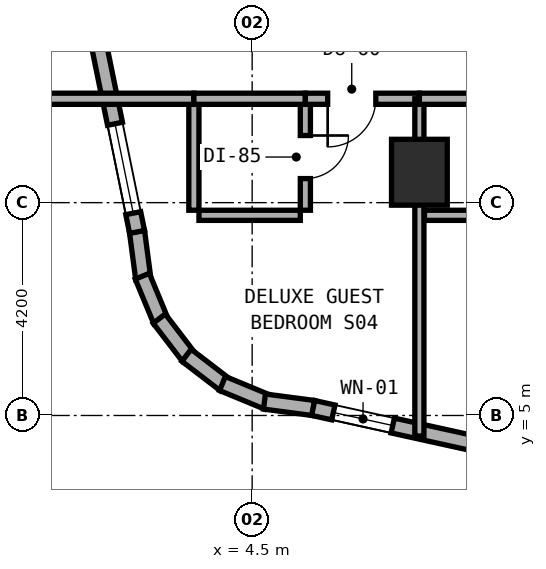
"""IFC4 building model, lengths in metres.
Left out: names, types, materials, properties, quantities, classifications, styles, units other than length and angle.
Written with IfcOpenShell. Run it as: python <this file> out.ifc"""

import sys

from ifc_helpers import new_model, si_unit, direction, frame, frame_2d, origin, origin_2d, place, context, subcontext, project, spatial, rectangle, extrude, element, fill, save


model = new_model("IFC4")
c1 = context("Model", 3, precision=1e-05, world=origin(), true_north=direction((0.0, 1.0)))
c2 = subcontext(c1, "Body", "Model", "MODEL_VIEW")
j1 = project(units=[si_unit("LENGTHUNIT", "METRE"), si_unit("PLANEANGLEUNIT", "RADIAN")], contexts=[c1])
p1 = place(None, origin())
s1 = spatial("IfcSite", under=j1, at=p1, CompositionType="ELEMENT")
p2 = place(p1, origin())
s2 = spatial("IfcBuilding", under=s1, at=p2, CompositionType="ELEMENT")
p3 = place(p2, frame((0.0, 0.0, 31.0)))
s3 = spatial("IfcBuildingStorey", under=s2, at=p3, CompositionType="ELEMENT", Elevation=31.0)
p4 = place(p3, frame((7.8, 9.8, 0.0), z_axis=(0.0, 0.0, 1.0), x_axis=(1.0, 0.0, 0.0)))
e1 = element("IfcColumn", 1, at=p4, inside=s3, PredefinedType="COLUMN", context=c2, shape_type="SweptSolid", body=[
    extrude(rectangle(XDim=1.1, YDim=1.3, at=origin_2d()), origin(), (0.0, 0.0, 1.0), 3.5),
])
p5 = place(p3, frame((2.228, 8.628, 0.0), z_axis=(0.0, 0.0, 1.0), x_axis=(0.131174864804, -0.991359246108, 0.0)))
e2 = element("IfcWall", 2, at=p5, inside=s3, PredefinedType="STANDARD", context=c2, shape_type="SweptSolid", body=[
    extrude(rectangle(XDim=0.938, YDim=0.3, at=frame_2d((0.469, 0.0))), origin(), (0.0, 0.0, 1.0), 3.22),
])
p6 = place(p3, frame((2.332, 7.748, 0.0), z_axis=(0.0, 0.0, 1.0), x_axis=(0.382344263057, -0.924019948111, 0.0)))
e3 = element("IfcWall", 3, at=p6, inside=s3, PredefinedType="STANDARD", context=c2, shape_type="SweptSolid", body=[
    extrude(rectangle(XDim=0.955, YDim=0.3, at=frame_2d((0.477, 0.0))), origin(), (0.0, 0.0, 1.0), 3.22),
])
for number, where, z_axis, x_axis in (
    (4, (2.666, 6.911, 0.0), (0.0, 0.0, 1.0), (0.608, -0.794, 0.0)),
    (5, (3.205, 6.188, 0.0), (0.0, 0.0, 1.0), (0.794, -0.608, 0.0)),
):
    element("IfcWall", number, at=place(p3, frame(where, z_axis=z_axis, x_axis=x_axis)), inside=s3, PredefinedType="STANDARD", context=c2, shape_type="SweptSolid", body=[
        extrude(rectangle(XDim=0.955, YDim=0.3, at=frame_2d((0.478, 0.0))), origin(), (0.0, 0.0, 1.0), 3.22),
    ])
p7 = place(p3, frame((3.914, 5.631, 0.0), z_axis=(0.0, 0.0, 1.0), x_axis=(0.923982547689, -0.382434636986, 0.0)))
e6 = element("IfcWall", 6, at=p7, inside=s3, PredefinedType="STANDARD", context=c2, shape_type="SweptSolid", body=[
    extrude(rectangle(XDim=0.954, YDim=0.3, at=frame_2d((0.477, 0.0))), origin(), (0.0, 0.0, 1.0), 3.22),
])
p8 = place(p3, frame((4.743, 5.275, 0.0), z_axis=(0.0, 0.0, 1.0), x_axis=(0.99145856342, -0.130422072598, 0.0)))
e7 = element("IfcWall", 7, at=p8, inside=s3, PredefinedType="STANDARD", context=c2, shape_type="SweptSolid", body=[
    extrude(rectangle(XDim=0.973, YDim=0.3, at=frame_2d((0.487, 0.0))), origin(), (0.0, 0.0, 1.0), 3.22),
])
p9 = place(p3, frame((5.704, 5.148, 0.0), z_axis=(0.0, 0.0, 1.0), x_axis=(0.9765437942, -0.215318875183, 0.0)))
e8 = element("IfcWall", 8, at=p9, inside=s3, PredefinedType="STANDARD", context=c2, shape_type="SweptSolid", body=[
    extrude(rectangle(XDim=9.353, YDim=0.3, at=frame_2d((4.677, 0.0))), origin(), (0.0, 0.0, 1.0), 3.22),
])
p10 = place(p9, frame((0.408, 0.0, 0.85)))
e9 = element("IfcOpeningElement", 9, at=p10, cuts=e8, PredefinedType="OPENING", context=c2, shape_type="SweptSolid", body=[
    extrude(rectangle(XDim=1.2, YDim=1.5, at=frame_2d((0.6, 0.75))), frame((0.0, 0.16, 0.0), z_axis=(0.0, -1.0, 0.0), x_axis=(1.0, 0.0, 0.0)), (0.0, 0.0, 1.0), 0.32),
])
p11 = place(p9, frame((4.59, 0.0, 0.8)))
e10 = element("IfcOpeningElement", 10, at=p11, cuts=e8, PredefinedType="OPENING", context=c2, shape_type="SweptSolid", body=[
    extrude(rectangle(XDim=2.4, YDim=1.6, at=frame_2d((1.2, 0.8))), frame((0.0, 0.16, 0.0), z_axis=(0.0, -1.0, 0.0), x_axis=(1.0, 0.0, 0.0)), (0.0, 0.0, 1.0), 0.32),
])
p12 = place(p3, frame((0.216, 18.484, 0.0), z_axis=(0.0, 0.0, 1.0), x_axis=(0.199990901713, -0.979797754249, 0.0)))
e11 = element("IfcWall", 11, at=p12, inside=s3, PredefinedType="STANDARD", context=c2, shape_type="SweptSolid", body=[
    extrude(rectangle(XDim=10.065, YDim=0.3, at=frame_2d((5.033, 0.0))), origin(), (0.0, 0.0, 1.0), 3.22),
])
p13 = place(p12, frame((2.429, 0.0, 0.8)))
e12 = element("IfcOpeningElement", 12, at=p13, cuts=e11, PredefinedType="OPENING", context=c2, shape_type="SweptSolid", body=[
    extrude(rectangle(XDim=2.4, YDim=1.6, at=frame_2d((1.2, 0.8))), frame((0.0, 0.16, 0.0), z_axis=(0.0, -1.0, 0.0), x_axis=(1.0, 0.0, 0.0)), (0.0, 0.0, 1.0), 0.32),
])
p14 = place(p12, frame((7.887, 0.0, 0.85)))
e13 = element("IfcOpeningElement", 13, at=p14, cuts=e11, PredefinedType="OPENING", context=c2, shape_type="SweptSolid", body=[
    extrude(rectangle(XDim=1.8, YDim=1.5, at=frame_2d((0.9, 0.75))), frame((0.0, 0.16, 0.0), z_axis=(0.0, -1.0, 0.0), x_axis=(1.0, 0.0, 0.0)), (0.0, 0.0, 1.0), 0.32),
])
p15 = place(p3, frame((5.55, 9.05, 0.0), z_axis=(0.0, 0.0, 1.0), x_axis=(0.0, 1.0, 0.0)))
e14 = element("IfcWall", 14, at=p15, inside=s3, PredefinedType="PLUMBINGWALL", context=c2, shape_type="SweptSolid", body=[
    extrude(rectangle(XDim=2.1, YDim=0.2, at=frame_2d((1.05, 0.0))), origin(), (0.0, 0.0, 1.0), 3.22),
])
p16 = place(p15, frame((0.625, 0.0, 0.0)))
e15 = element("IfcOpeningElement", 15, at=p16, cuts=e14, PredefinedType="OPENING", context=c2, shape_type="SweptSolid", body=[
    extrude(rectangle(XDim=0.85, YDim=2.1, at=frame_2d((0.425, 1.05))), frame((0.0, 0.11, 0.0), z_axis=(0.0, -1.0, 0.0), x_axis=(1.0, 0.0, 0.0)), (0.0, 0.0, 1.0), 0.22),
])
p17 = place(p3, frame((3.45, 8.95, 0.0), z_axis=(0.0, 0.0, 1.0), x_axis=(1.0, 0.0, 0.0)))
e16 = element("IfcWall", 16, at=p17, inside=s3, PredefinedType="PLUMBINGWALL", context=c2, shape_type="SweptSolid", body=[
    extrude(rectangle(XDim=2.0, YDim=0.2, at=frame_2d((1.0, 0.0))), origin(), (0.0, 0.0, 1.0), 3.22),
])
p18 = place(p3, frame((3.35, 9.05, 0.0), z_axis=(0.0, 0.0, 1.0), x_axis=(0.0, 1.0, 0.0)))
e17 = element("IfcWall", 17, at=p18, inside=s3, PredefinedType="PLUMBINGWALL", context=c2, shape_type="SweptSolid", body=[
    extrude(rectangle(XDim=2.1, YDim=0.2, at=frame_2d((1.05, 0.0))), origin(), (0.0, 0.0, 1.0), 3.22),
])
p19 = place(p3, frame((0.24, 11.25, 0.0), z_axis=(0.0, 0.0, 1.0), x_axis=(1.0, 0.0, 0.0)))
e18 = element("IfcWall", 18, at=p19, inside=s3, PredefinedType="SOLIDWALL", context=c2, shape_type="SweptSolid", body=[
    extrude(rectangle(XDim=3.11, YDim=0.22, at=frame_2d((1.555, 0.0))), origin(), (0.0, 0.0, 1.0), 3.22),
])
p20 = place(p3, frame((3.35, 11.25, 0.0), z_axis=(0.0, 0.0, 1.0), x_axis=(1.0, 0.0, 0.0)))
e19 = element("IfcWall", 19, at=p20, inside=s3, PredefinedType="SOLIDWALL", context=c2, shape_type="SweptSolid", body=[
    extrude(rectangle(XDim=2.2, YDim=0.22, at=frame_2d((1.1, 0.0))), origin(), (0.0, 0.0, 1.0), 3.22),
])
p21 = place(p3, frame((5.55, 11.25, 0.0), z_axis=(0.0, 0.0, 1.0), x_axis=(1.0, 0.0, 0.0)))
e20 = element("IfcWall", 20, at=p21, inside=s3, PredefinedType="SOLIDWALL", context=c2, shape_type="SweptSolid", body=[
    extrude(rectangle(XDim=2.25, YDim=0.22, at=frame_2d((1.125, 0.0))), origin(), (0.0, 0.0, 1.0), 2.395),
])
p22 = place(p21, frame((0.44, 0.0, 0.0)))
e21 = element("IfcOpeningElement", 21, at=p22, cuts=e20, PredefinedType="OPENING", context=c2, shape_type="SweptSolid", body=[
    extrude(rectangle(XDim=0.95, YDim=2.1, at=frame_2d((0.475, 1.05))), frame((0.0, 0.12, 0.0), z_axis=(0.0, -1.0, 0.0), x_axis=(1.0, 0.0, 0.0)), (0.0, 0.0, 1.0), 0.24),
])
p23 = place(p3, frame((7.8, 4.594, 0.0), z_axis=(0.0, 0.0, 1.0), x_axis=(0.0, 1.0, 0.0)))
e22 = element("IfcWall", 22, at=p23, inside=s3, PredefinedType="SOLIDWALL", context=c2, shape_type="SweptSolid", body=[
    extrude(rectangle(XDim=6.656, YDim=0.18, at=frame_2d((3.328, 0.0))), origin(), (0.0, 0.0, 1.0), 2.395),
])
p24 = place(p3, frame((7.9, 8.95, 0.0), z_axis=(0.0, 0.0, 1.0), x_axis=(1.0, 0.0, 0.0)))
e23 = element("IfcWall", 23, at=p24, inside=s3, PredefinedType="PLUMBINGWALL", context=c2, shape_type="SweptSolid", body=[
    extrude(rectangle(XDim=2.0, YDim=0.2, at=frame_2d((1.0, 0.0))), origin(), (0.0, 0.0, 1.0), 3.22),
])
p25 = place(p3, frame((7.8, 11.25, 0.0), z_axis=(0.0, 0.0, 1.0), x_axis=(1.0, 0.0, 0.0)))
e24 = element("IfcWall", 24, at=p25, inside=s3, PredefinedType="SOLIDWALL", context=c2, shape_type="SweptSolid", body=[
    extrude(rectangle(XDim=2.2, YDim=0.22, at=frame_2d((1.1, 0.0))), origin(), (0.0, 0.0, 1.0), 2.395),
])
p26 = place(p10, origin())
e25 = element("IfcWindow", 25, at=p26, inside=s3, PartitioningType="SINGLE_PANEL", PredefinedType="WINDOW", context=c2, shape_type="SweptSolid", body=[
    extrude(rectangle(XDim=1.2, YDim=1.5, at=frame_2d((0.6, 0.75))), frame((0.0, 0.03, 0.0), z_axis=(0.0, -1.0, 0.0), x_axis=(1.0, 0.0, 0.0)), (0.0, 0.0, 1.0), 0.06),
])
fill(e9, e25)
p27 = place(p14, origin())
e26 = element("IfcWindow", 26, at=p27, inside=s3, PartitioningType="SINGLE_PANEL", PredefinedType="WINDOW", context=c2, shape_type="SweptSolid", body=[
    extrude(rectangle(XDim=1.8, YDim=1.5, at=frame_2d((0.9, 0.75))), frame((0.0, 0.03, 0.0), z_axis=(0.0, -1.0, 0.0), x_axis=(1.0, 0.0, 0.0)), (0.0, 0.0, 1.0), 0.06),
])
fill(e13, e26)
p28 = place(p16, frame((0.85, 0.0, 0.0), z_axis=(0.0, 0.0, 1.0), x_axis=(-1.0, 0.0, 0.0)))
e27 = element("IfcDoor", 27, at=p28, inside=s3, OperationType="SINGLE_SWING_LEFT", PredefinedType="DOOR", context=c2, shape_type="SweptSolid", body=[
    extrude(rectangle(XDim=0.85, YDim=2.1, at=frame_2d((0.425, 1.05))), frame((0.0, 0.025, 0.0), z_axis=(0.0, -1.0, 0.0), x_axis=(1.0, 0.0, 0.0)), (0.0, 0.0, 1.0), 0.05),
])
fill(e15, e27)
p29 = place(p22, frame((0.95, 0.0, 0.0), z_axis=(0.0, 0.0, 1.0), x_axis=(-1.0, 0.0, 0.0)))
e28 = element("IfcDoor", 28, at=p29, inside=s3, OperationType="SINGLE_SWING_RIGHT", PredefinedType="DOOR", context=c2, shape_type="SweptSolid", body=[
    extrude(rectangle(XDim=0.95, YDim=2.1, at=frame_2d((0.475, 1.05))), frame((0.0, 0.025, 0.0), z_axis=(0.0, -1.0, 0.0), x_axis=(1.0, 0.0, 0.0)), (0.0, 0.0, 1.0), 0.05),
])
fill(e21, e28)
save(model, sys.argv[1])
